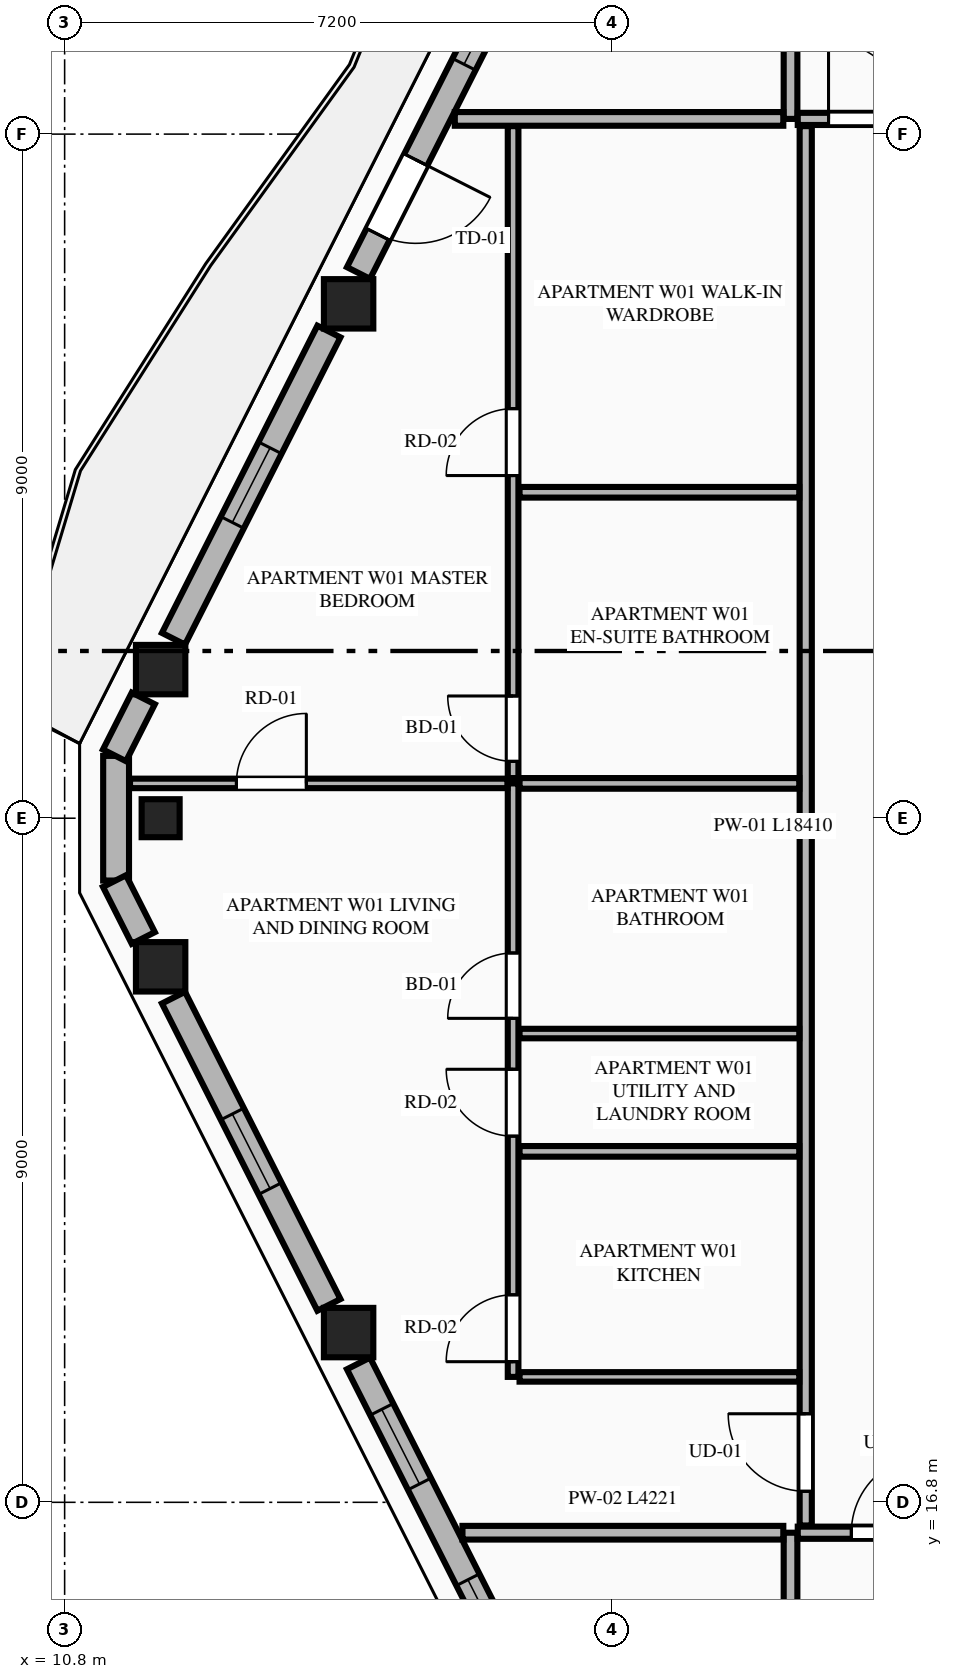
"""IFC4 building model, lengths in metres.
Left out: names, types, materials, properties, quantities, classifications, styles, units other than length and angle.
Written with IfcOpenShell. Run it as: python <this file> out.ifc"""

import sys

from ifc_helpers import new_model, si_unit, direction, frame, frame_2d, origin, origin_2d, place, context, subcontext, project, spatial, rectangle, extrude, element, fill, save


model = new_model("IFC4")
c1 = context("Model", 3, precision=1e-05, world=origin(), true_north=direction((0.0, 1.0)))
c2 = subcontext(c1, "Body", "Model", "MODEL_VIEW")
j1 = project(units=[si_unit("LENGTHUNIT", "METRE"), si_unit("PLANEANGLEUNIT", "RADIAN")], contexts=[c1])
p1 = place(None, origin())
s1 = spatial("IfcSite", under=j1, at=p1, CompositionType="ELEMENT")
p2 = place(p1, origin())
s2 = spatial("IfcBuilding", under=s1, at=p2, CompositionType="ELEMENT")
p3 = place(p2, frame((0.0, 0.0, 274.45)))
s3 = spatial("IfcBuildingStorey", under=s2, at=p3, CompositionType="ELEMENT", Elevation=274.45)
for number, where, z_axis, x_axis in (
    (1, (14.536, 32.567, 0.0), (0.0, 0.0, 1.0), (1.0, 0.0, 0.0)),
    (2, (12.063, 27.755, 0.0), (0.0, 0.0, 1.0), (1.0, 0.0, 0.0)),
    (3, (12.063, 23.845, 0.0), (0.0, 0.0, 1.0), (1.0, 0.0, 0.0)),
    (4, (14.536, 19.033, 0.0), (0.0, 0.0, 1.0), (1.0, 0.0, 0.0)),
):
    element("IfcColumn", number, at=place(p3, frame(where, z_axis=z_axis, x_axis=x_axis)), inside=s3, PredefinedType="COLUMN", context=c2, shape_type="SweptSolid", body=[
        extrude(rectangle(XDim=0.65, YDim=0.65, at=origin_2d()), origin(), (0.0, 0.0, 1.0), 3.65),
    ])
p4 = place(p3, frame((12.063, 25.8, 0.0), z_axis=(0.0, 0.0, 1.0), x_axis=(0.0, -1.0, 0.0)))
e5 = element("IfcColumn", 5, at=p4, inside=s3, PredefinedType="PILASTER", context=c2, shape_type="SweptSolid", body=[
    extrude(rectangle(XDim=0.5, YDim=0.35, at=origin_2d()), origin(), (0.0, 0.0, 1.0), 3.65),
])
p5 = place(p3, frame((11.477, 26.62, 0.0), z_axis=(0.0, 0.0, 1.0), x_axis=(0.0, -1.0, 0.0)))
e6 = element("IfcWall", 6, at=p5, inside=s3, PredefinedType="STANDARD", context=c2, shape_type="SweptSolid", body=[
    extrude(rectangle(XDim=1.64, YDim=0.34, at=frame_2d((0.82, 0.0))), origin(), (0.0, 0.0, 1.0), 3.37),
])
p6 = place(p3, frame((16.798, 37.187, 0.0), z_axis=(0.0, 0.0, 1.0), x_axis=(-0.451447516904, -0.892297674255, 0.0)))
e7 = element("IfcWall", 7, at=p6, inside=s3, PredefinedType="STANDARD", context=c2, shape_type="SweptSolid", body=[
    extrude(rectangle(XDim=4.723, YDim=0.34, at=frame_2d((2.361, 0.0))), origin(), (0.0, 0.0, 1.0), 2.46),
])
p7 = place(p6, frame((3.053, 0.0, 0.0)))
e8 = element("IfcOpeningElement", 8, at=p7, cuts=e7, PredefinedType="OPENING", context=c2, shape_type="SweptSolid", body=[
    extrude(rectangle(XDim=1.1, YDim=2.25, at=frame_2d((0.55, 1.125))), frame((0.0, 0.18, 0.0), z_axis=(0.0, -1.0, 0.0), x_axis=(1.0, 0.0, 0.0)), (0.0, 0.0, 1.0), 0.36),
])
p8 = place(p6, frame((0.546, 0.0, 0.75)))
e9 = element("IfcOpeningElement", 9, at=p8, cuts=e7, PredefinedType="OPENING", context=c2, shape_type="SweptSolid", body=[
    extrude(rectangle(XDim=1.1, YDim=1.56, at=frame_2d((0.55, 0.78))), frame((0.0, 0.18, 0.0), z_axis=(0.0, -1.0, 0.0), x_axis=(1.0, 0.0, 0.0)), (0.0, 0.0, 1.0), 0.36),
])
p9 = place(p3, frame((14.277, 32.203, 0.0), z_axis=(0.0, 0.0, 1.0), x_axis=(-0.45147697324, -0.892282770558, 0.0)))
e10 = element("IfcWall", 10, at=p9, inside=s3, PredefinedType="STANDARD", context=c2, shape_type="SweptSolid", body=[
    extrude(rectangle(XDim=4.53, YDim=0.34, at=frame_2d((2.265, 0.0))), origin(), (0.0, 0.0, 1.0), 2.46),
])
p10 = place(p9, frame((1.715, 0.0, 0.75)))
e11 = element("IfcOpeningElement", 11, at=p10, cuts=e10, PredefinedType="OPENING", context=c2, shape_type="SweptSolid", body=[
    extrude(rectangle(XDim=1.1, YDim=1.56, at=frame_2d((0.55, 0.78))), frame((0.0, 0.18, 0.0), z_axis=(0.0, -1.0, 0.0), x_axis=(1.0, 0.0, 0.0)), (0.0, 0.0, 1.0), 0.36),
])
p11 = place(p3, frame((11.835, 27.376, 0.0), z_axis=(0.0, 0.0, 1.0), x_axis=(-0.45139691133, -0.892323275748, 0.0)))
e12 = element("IfcWall", 12, at=p11, inside=s3, PredefinedType="STANDARD", context=c2, shape_type="SweptSolid", body=[
    extrude(rectangle(XDim=0.839, YDim=0.34, at=frame_2d((0.42, 0.0))), origin(), (0.0, 0.0, 1.0), 3.37),
])
p12 = place(p3, frame((11.456, 24.973, 0.0), z_axis=(0.0, 0.0, 1.0), x_axis=(0.4515140893, -0.892263989615, 0.0)))
e13 = element("IfcWall", 13, at=p12, inside=s3, PredefinedType="STANDARD", context=c2, shape_type="SweptSolid", body=[
    extrude(rectangle(XDim=0.839, YDim=0.34, at=frame_2d((0.419, 0.0))), origin(), (0.0, 0.0, 1.0), 3.37),
])
p13 = place(p3, frame((12.232, 23.439, 0.0), z_axis=(0.0, 0.0, 1.0), x_axis=(0.45147697324, -0.892282770558, 0.0)))
e14 = element("IfcWall", 14, at=p13, inside=s3, PredefinedType="STANDARD", context=c2, shape_type="SweptSolid", body=[
    extrude(rectangle(XDim=4.53, YDim=0.34, at=frame_2d((2.265, 0.0))), origin(), (0.0, 0.0, 1.0), 2.46),
])
p14 = place(p13, frame((1.715, 0.0, 0.75)))
e15 = element("IfcOpeningElement", 15, at=p14, cuts=e14, PredefinedType="OPENING", context=c2, shape_type="SweptSolid", body=[
    extrude(rectangle(XDim=1.1, YDim=1.56, at=frame_2d((0.55, 0.78))), frame((0.0, 0.18, 0.0), z_axis=(0.0, -1.0, 0.0), x_axis=(1.0, 0.0, 0.0)), (0.0, 0.0, 1.0), 0.36),
])
p15 = place(p3, frame((14.666, 18.627, 0.0), z_axis=(0.0, 0.0, 1.0), x_axis=(0.451468341582, -0.892287137949, 0.0)))
e16 = element("IfcWall", 16, at=p15, inside=s3, PredefinedType="STANDARD", context=c2, shape_type="SweptSolid", body=[
    extrude(rectangle(XDim=4.723, YDim=0.34, at=frame_2d((2.361, 0.0))), origin(), (0.0, 0.0, 1.0), 2.46),
])
p16 = place(p15, frame((0.677, 0.0, 0.75)))
e17 = element("IfcOpeningElement", 17, at=p16, cuts=e16, PredefinedType="OPENING", context=c2, shape_type="SweptSolid", body=[
    extrude(rectangle(XDim=1.1, YDim=1.56, at=frame_2d((0.55, 0.78))), frame((0.0, 0.18, 0.0), z_axis=(0.0, -1.0, 0.0), x_axis=(1.0, 0.0, 0.0)), (0.0, 0.0, 1.0), 0.36),
])
p17 = place(p15, frame((3.189, 0.0, 0.75)))
e18 = element("IfcOpeningElement", 18, at=p17, cuts=e16, PredefinedType="OPENING", context=c2, shape_type="SweptSolid", body=[
    extrude(rectangle(XDim=1.1, YDim=1.56, at=frame_2d((0.55, 0.78))), frame((0.0, 0.18, 0.0), z_axis=(0.0, -1.0, 0.0), x_axis=(1.0, 0.0, 0.0)), (0.0, 0.0, 1.0), 0.36),
])
p18 = place(p3, frame((20.35, 8.119, 0.0), z_axis=(0.0, 0.0, 1.0), x_axis=(0.0, 1.0, 0.0)))
e19 = element("IfcWall", 19, at=p18, inside=s3, PredefinedType="PARTITIONING", context=c2, shape_type="SweptSolid", body=[
    extrude(rectangle(XDim=8.281, YDim=0.18, at=frame_2d((4.141, 0.0))), origin(), (0.0, 0.0, 1.0), 3.37),
])
p19 = place(p3, frame((20.445, 16.4, 0.0), z_axis=(0.0, 0.0, 1.0), x_axis=(1.0, 0.0, 0.0)))
e20 = element("IfcWall", 20, at=p19, inside=s3, PredefinedType="PARTITIONING", context=c2, shape_type="SweptSolid", body=[
    extrude(rectangle(XDim=8.606, YDim=0.16, at=frame_2d((4.303, 0.0))), origin(), (0.0, 0.0, 1.0), 3.37),
])
p20 = place(p19, frame((0.705, 0.0, 0.0)))
e21 = element("IfcOpeningElement", 21, at=p20, cuts=e20, PredefinedType="OPENING", context=c2, shape_type="SweptSolid", body=[
    extrude(rectangle(XDim=1.02, YDim=2.25, at=frame_2d((0.51, 1.125))), frame((0.0, 0.09, 0.0), z_axis=(0.0, -1.0, 0.0), x_axis=(1.0, 0.0, 0.0)), (0.0, 0.0, 1.0), 0.18),
])
p21 = place(p3, frame((20.35, 35.0, 0.0), z_axis=(0.0, 0.0, 1.0), x_axis=(0.0, 1.0, 0.0)))
e22 = element("IfcWall", 22, at=p21, inside=s3, PredefinedType="PARTITIONING", context=c2, shape_type="SweptSolid", body=[
    extrude(rectangle(XDim=8.481, YDim=0.18, at=frame_2d((4.24, 0.0))), origin(), (0.0, 0.0, 1.0), 3.37),
])
p22 = place(p3, frame((20.445, 35.0, 0.0), z_axis=(0.0, 0.0, 1.0), x_axis=(1.0, 0.0, 0.0)))
e23 = element("IfcWall", 23, at=p22, inside=s3, PredefinedType="PARTITIONING", context=c2, shape_type="SweptSolid", body=[
    extrude(rectangle(XDim=15.114, YDim=0.16, at=frame_2d((7.557, 0.0))), origin(), (0.0, 0.0, 1.0), 3.37),
])
p23 = place(p22, frame((0.405, 0.0, 0.0)))
e24 = element("IfcOpeningElement", 24, at=p23, cuts=e23, PredefinedType="OPENING", context=c2, shape_type="SweptSolid", body=[
    extrude(rectangle(XDim=1.02, YDim=2.25, at=frame_2d((0.51, 1.125))), frame((0.0, 0.09, 0.0), z_axis=(0.0, -1.0, 0.0), x_axis=(1.0, 0.0, 0.0)), (0.0, 0.0, 1.0), 0.18),
])
p24 = place(p3, frame((16.034, 16.4, 0.0), z_axis=(0.0, 0.0, 1.0), x_axis=(1.0, 0.0, 0.0)))
e25 = element("IfcWall", 25, at=p24, inside=s3, PredefinedType="PARTITIONING", context=c2, shape_type="SweptSolid", body=[
    extrude(rectangle(XDim=4.221, YDim=0.18, at=frame_2d((2.11, 0.0))), origin(), (0.0, 0.0, 1.0), 3.37),
])
p25 = place(p3, frame((15.933, 35.0, 0.0), z_axis=(0.0, 0.0, 1.0), x_axis=(1.0, 0.0, 0.0)))
e26 = element("IfcWall", 26, at=p25, inside=s3, PredefinedType="PARTITIONING", context=c2, shape_type="SweptSolid", body=[
    extrude(rectangle(XDim=4.322, YDim=0.18, at=frame_2d((2.161, 0.0))), origin(), (0.0, 0.0, 1.0), 3.37),
])
p26 = place(p3, frame((20.55, 16.495, 0.0), z_axis=(0.0, 0.0, 1.0), x_axis=(0.0, 1.0, 0.0)))
e27 = element("IfcWall", 27, at=p26, inside=s3, PredefinedType="PARTITIONING", context=c2, shape_type="SweptSolid", body=[
    extrude(rectangle(XDim=18.41, YDim=0.16, at=frame_2d((9.205, 0.0))), origin(), (0.0, 0.0, 1.0), 3.057),
])
p27 = place(p26, frame((0.45, 0.0, 0.0)))
e28 = element("IfcOpeningElement", 28, at=p27, cuts=e27, PredefinedType="OPENING", context=c2, shape_type="SweptSolid", body=[
    extrude(rectangle(XDim=1.02, YDim=2.25, at=frame_2d((0.51, 1.125))), frame((0.0, 0.09, 0.0), z_axis=(0.0, -1.0, 0.0), x_axis=(1.0, 0.0, 0.0)), (0.0, 0.0, 1.0), 0.18),
])
p28 = place(p3, frame((16.785, 18.45, 0.0), z_axis=(0.0, 0.0, 1.0), x_axis=(1.0, 0.0, 0.0)))
e29 = element("IfcWall", 29, at=p28, inside=s3, PredefinedType="PARTITIONING", context=c2, shape_type="SweptSolid", body=[
    extrude(rectangle(XDim=3.68, YDim=0.125, at=frame_2d((1.84, 0.0))), origin(), (0.0, 0.0, 1.0), 3.37),
])
p29 = place(p3, frame((16.7, 18.45, 0.0), z_axis=(0.0, 0.0, 1.0), x_axis=(0.0, 1.0, 0.0)))
e30 = element("IfcWall", 30, at=p29, inside=s3, PredefinedType="PLUMBINGWALL", context=c2, shape_type="SweptSolid", body=[
    extrude(rectangle(XDim=7.808, YDim=0.14, at=frame_2d((3.904, 0.0))), origin(), (0.0, 0.0, 1.0), 3.37),
])
p30 = place(p29, frame((0.2, 0.0, 0.0)))
e31 = element("IfcOpeningElement", 31, at=p30, cuts=e30, PredefinedType="OPENING", context=c2, shape_type="SweptSolid", body=[
    extrude(rectangle(XDim=0.88, YDim=2.15, at=frame_2d((0.44, 1.075))), frame((0.0, 0.08, 0.0), z_axis=(0.0, -1.0, 0.0), x_axis=(1.0, 0.0, 0.0)), (0.0, 0.0, 1.0), 0.16),
])
p31 = place(p29, frame((3.167, 0.0, 0.0)))
e32 = element("IfcOpeningElement", 32, at=p31, cuts=e30, PredefinedType="OPENING", context=c2, shape_type="SweptSolid", body=[
    extrude(rectangle(XDim=0.88, YDim=2.15, at=frame_2d((0.44, 1.075))), frame((0.0, 0.08, 0.0), z_axis=(0.0, -1.0, 0.0), x_axis=(1.0, 0.0, 0.0)), (0.0, 0.0, 1.0), 0.16),
])
p32 = place(p29, frame((4.717, 0.0, 0.0)))
e33 = element("IfcOpeningElement", 33, at=p32, cuts=e30, PredefinedType="OPENING", context=c2, shape_type="SweptSolid", body=[
    extrude(rectangle(XDim=0.86, YDim=2.1, at=frame_2d((0.43, 1.05))), frame((0.0, 0.08, 0.0), z_axis=(0.0, -1.0, 0.0), x_axis=(1.0, 0.0, 0.0)), (0.0, 0.0, 1.0), 0.16),
])
p33 = place(p3, frame((16.7, 26.328, 0.0), z_axis=(0.0, 0.0, 1.0), x_axis=(0.0, 1.0, 0.0)))
e34 = element("IfcWall", 34, at=p33, inside=s3, PredefinedType="PLUMBINGWALL", context=c2, shape_type="SweptSolid", body=[
    extrude(rectangle(XDim=8.577, YDim=0.14, at=frame_2d((4.289, 0.0))), origin(), (0.0, 0.0, 1.0), 3.37),
])
p34 = place(p33, frame((0.22, 0.0, 0.0)))
e35 = element("IfcOpeningElement", 35, at=p34, cuts=e34, PredefinedType="OPENING", context=c2, shape_type="SweptSolid", body=[
    extrude(rectangle(XDim=0.86, YDim=2.1, at=frame_2d((0.43, 1.05))), frame((0.0, 0.08, 0.0), z_axis=(0.0, -1.0, 0.0), x_axis=(1.0, 0.0, 0.0)), (0.0, 0.0, 1.0), 0.16),
])
p35 = place(p33, frame((3.98, 0.0, 0.0)))
e36 = element("IfcOpeningElement", 36, at=p35, cuts=e34, PredefinedType="OPENING", context=c2, shape_type="SweptSolid", body=[
    extrude(rectangle(XDim=0.88, YDim=2.15, at=frame_2d((0.44, 1.075))), frame((0.0, 0.08, 0.0), z_axis=(0.0, -1.0, 0.0), x_axis=(1.0, 0.0, 0.0)), (0.0, 0.0, 1.0), 0.16),
])
p36 = place(p3, frame((16.785, 26.258, 0.0), z_axis=(0.0, 0.0, 1.0), x_axis=(1.0, 0.0, 0.0)))
e37 = element("IfcWall", 37, at=p36, inside=s3, PredefinedType="PLUMBINGWALL", context=c2, shape_type="SweptSolid", body=[
    extrude(rectangle(XDim=3.68, YDim=0.14, at=frame_2d((1.84, 0.0))), origin(), (0.0, 0.0, 1.0), 3.37),
])
p37 = place(p3, frame((11.66, 26.258, 0.0), z_axis=(0.0, 0.0, 1.0), x_axis=(1.0, 0.0, 0.0)))
e38 = element("IfcWall", 38, at=p37, inside=s3, PredefinedType="PARTITIONING", context=c2, shape_type="SweptSolid", body=[
    extrude(rectangle(XDim=4.965, YDim=0.125, at=frame_2d((2.482, 0.0))), origin(), (0.0, 0.0, 1.0), 3.37),
])
p38 = place(p37, frame((1.4, 0.0, 0.0)))
e39 = element("IfcOpeningElement", 39, at=p38, cuts=e38, PredefinedType="OPENING", context=c2, shape_type="SweptSolid", body=[
    extrude(rectangle(XDim=0.92, YDim=2.15, at=frame_2d((0.46, 1.075))), frame((0.0, 0.073, 0.0), z_axis=(0.0, -1.0, 0.0), x_axis=(1.0, 0.0, 0.0)), (0.0, 0.0, 1.0), 0.145),
])
p39 = place(p3, frame((16.785, 21.417, 0.0), z_axis=(0.0, 0.0, 1.0), x_axis=(1.0, 0.0, 0.0)))
e40 = element("IfcWall", 40, at=p39, inside=s3, PredefinedType="PLUMBINGWALL", context=c2, shape_type="SweptSolid", body=[
    extrude(rectangle(XDim=3.68, YDim=0.14, at=frame_2d((1.84, 0.0))), origin(), (0.0, 0.0, 1.0), 3.37),
])
p40 = place(p3, frame((16.785, 22.967, 0.0), z_axis=(0.0, 0.0, 1.0), x_axis=(1.0, 0.0, 0.0)))
e41 = element("IfcWall", 41, at=p40, inside=s3, PredefinedType="PARTITIONING", context=c2, shape_type="SweptSolid", body=[
    extrude(rectangle(XDim=3.68, YDim=0.125, at=frame_2d((1.84, 0.0))), origin(), (0.0, 0.0, 1.0), 3.37),
])
p41 = place(p3, frame((16.785, 30.088, 0.0), z_axis=(0.0, 0.0, 1.0), x_axis=(1.0, 0.0, 0.0)))
e42 = element("IfcWall", 42, at=p41, inside=s3, PredefinedType="PLUMBINGWALL", context=c2, shape_type="SweptSolid", body=[
    extrude(rectangle(XDim=3.68, YDim=0.14, at=frame_2d((1.84, 0.0))), origin(), (0.0, 0.0, 1.0), 3.37),
])
p42 = place(p7, origin())
e43 = element("IfcDoor", 43, at=p42, inside=s3, OperationType="SINGLE_SWING_LEFT", PredefinedType="DOOR", context=c2, shape_type="SweptSolid", body=[
    extrude(rectangle(XDim=1.1, YDim=2.25, at=frame_2d((0.55, 1.125))), frame((0.0, 0.025, 0.0), z_axis=(0.0, -1.0, 0.0), x_axis=(1.0, 0.0, 0.0)), (0.0, 0.0, 1.0), 0.05),
])
fill(e8, e43)
p43 = place(p10, origin())
e44 = element("IfcWindow", 44, at=p43, inside=s3, PartitioningType="SINGLE_PANEL", PredefinedType="WINDOW", context=c2, shape_type="SweptSolid", body=[
    extrude(rectangle(XDim=1.1, YDim=1.56, at=frame_2d((0.55, 0.78))), frame((0.0, 0.03, 0.0), z_axis=(0.0, -1.0, 0.0), x_axis=(1.0, 0.0, 0.0)), (0.0, 0.0, 1.0), 0.06),
])
fill(e11, e44)
p44 = place(p14, origin())
e45 = element("IfcWindow", 45, at=p44, inside=s3, PartitioningType="SINGLE_PANEL", PredefinedType="WINDOW", context=c2, shape_type="SweptSolid", body=[
    extrude(rectangle(XDim=1.1, YDim=1.56, at=frame_2d((0.55, 0.78))), frame((0.0, 0.03, 0.0), z_axis=(0.0, -1.0, 0.0), x_axis=(1.0, 0.0, 0.0)), (0.0, 0.0, 1.0), 0.06),
])
fill(e15, e45)
p45 = place(p16, origin())
e46 = element("IfcWindow", 46, at=p45, inside=s3, PartitioningType="SINGLE_PANEL", PredefinedType="WINDOW", context=c2, shape_type="SweptSolid", body=[
    extrude(rectangle(XDim=1.1, YDim=1.56, at=frame_2d((0.55, 0.78))), frame((0.0, 0.03, 0.0), z_axis=(0.0, -1.0, 0.0), x_axis=(1.0, 0.0, 0.0)), (0.0, 0.0, 1.0), 0.06),
])
fill(e17, e46)
p46 = place(p20, origin())
e47 = element("IfcDoor", 47, at=p46, inside=s3, OperationType="SINGLE_SWING_RIGHT", PredefinedType="DOOR", context=c2, shape_type="SweptSolid", body=[
    extrude(rectangle(XDim=1.02, YDim=2.25, at=frame_2d((0.51, 1.125))), frame((0.0, 0.025, 0.0), z_axis=(0.0, -1.0, 0.0), x_axis=(1.0, 0.0, 0.0)), (0.0, 0.0, 1.0), 0.05),
])
fill(e21, e47)
p47 = place(p23, origin())
e48 = element("IfcDoor", 48, at=p47, inside=s3, OperationType="SINGLE_SWING_LEFT", PredefinedType="DOOR", context=c2, shape_type="SweptSolid", body=[
    extrude(rectangle(XDim=1.02, YDim=2.25, at=frame_2d((0.51, 1.125))), frame((0.0, 0.025, 0.0), z_axis=(0.0, -1.0, 0.0), x_axis=(1.0, 0.0, 0.0)), (0.0, 0.0, 1.0), 0.05),
])
fill(e24, e48)
p48 = place(p30, origin())
e49 = element("IfcDoor", 49, at=p48, inside=s3, OperationType="SINGLE_SWING_LEFT", PredefinedType="DOOR", context=c2, shape_type="SweptSolid", body=[
    extrude(rectangle(XDim=0.88, YDim=2.15, at=frame_2d((0.44, 1.075))), frame((0.0, 0.025, 0.0), z_axis=(0.0, -1.0, 0.0), x_axis=(1.0, 0.0, 0.0)), (0.0, 0.0, 1.0), 0.05),
])
fill(e31, e49)
p49 = place(p31, origin())
e50 = element("IfcDoor", 50, at=p49, inside=s3, OperationType="SINGLE_SWING_RIGHT", PredefinedType="DOOR", context=c2, shape_type="SweptSolid", body=[
    extrude(rectangle(XDim=0.88, YDim=2.15, at=frame_2d((0.44, 1.075))), frame((0.0, 0.025, 0.0), z_axis=(0.0, -1.0, 0.0), x_axis=(1.0, 0.0, 0.0)), (0.0, 0.0, 1.0), 0.05),
])
fill(e32, e50)
p50 = place(p32, origin())
e51 = element("IfcDoor", 51, at=p50, inside=s3, OperationType="SINGLE_SWING_LEFT", PredefinedType="DOOR", context=c2, shape_type="SweptSolid", body=[
    extrude(rectangle(XDim=0.86, YDim=2.1, at=frame_2d((0.43, 1.05))), frame((0.0, 0.025, 0.0), z_axis=(0.0, -1.0, 0.0), x_axis=(1.0, 0.0, 0.0)), (0.0, 0.0, 1.0), 0.05),
])
fill(e33, e51)
p51 = place(p34, origin())
e52 = element("IfcDoor", 52, at=p51, inside=s3, OperationType="SINGLE_SWING_RIGHT", PredefinedType="DOOR", context=c2, shape_type="SweptSolid", body=[
    extrude(rectangle(XDim=0.86, YDim=2.1, at=frame_2d((0.43, 1.05))), frame((0.0, 0.025, 0.0), z_axis=(0.0, -1.0, 0.0), x_axis=(1.0, 0.0, 0.0)), (0.0, 0.0, 1.0), 0.05),
])
fill(e35, e52)
p52 = place(p35, origin())
e53 = element("IfcDoor", 53, at=p52, inside=s3, OperationType="SINGLE_SWING_LEFT", PredefinedType="DOOR", context=c2, shape_type="SweptSolid", body=[
    extrude(rectangle(XDim=0.88, YDim=2.15, at=frame_2d((0.44, 1.075))), frame((0.0, 0.025, 0.0), z_axis=(0.0, -1.0, 0.0), x_axis=(1.0, 0.0, 0.0)), (0.0, 0.0, 1.0), 0.05),
])
fill(e36, e53)
p53 = place(p27, origin())
e54 = element("IfcDoor", 54, at=p53, inside=s3, OperationType="SINGLE_SWING_RIGHT", PredefinedType="DOOR", context=c2, shape_type="SweptSolid", body=[
    extrude(rectangle(XDim=1.02, YDim=2.25, at=frame_2d((0.51, 1.125))), frame((0.0, 0.025, 0.0), z_axis=(0.0, -1.0, 0.0), x_axis=(1.0, 0.0, 0.0)), (0.0, 0.0, 1.0), 0.05),
])
fill(e28, e54)
p54 = place(p38, origin())
e55 = element("IfcDoor", 55, at=p54, inside=s3, OperationType="SINGLE_SWING_RIGHT", PredefinedType="DOOR", context=c2, shape_type="SweptSolid", body=[
    extrude(rectangle(XDim=0.92, YDim=2.15, at=frame_2d((0.46, 1.075))), frame((0.0, 0.025, 0.0), z_axis=(0.0, -1.0, 0.0), x_axis=(1.0, 0.0, 0.0)), (0.0, 0.0, 1.0), 0.05),
])
fill(e39, e55)
p55 = place(p8, origin())
e56 = element("IfcWindow", 56, at=p55, inside=s3, PartitioningType="SINGLE_PANEL", PredefinedType="WINDOW", context=c2, shape_type="SweptSolid", body=[
    extrude(rectangle(XDim=1.1, YDim=1.56, at=frame_2d((0.55, 0.78))), frame((0.0, 0.03, 0.0), z_axis=(0.0, -1.0, 0.0), x_axis=(1.0, 0.0, 0.0)), (0.0, 0.0, 1.0), 0.06),
])
fill(e9, e56)
p56 = place(p17, origin())
e57 = element("IfcWindow", 57, at=p56, inside=s3, PartitioningType="SINGLE_PANEL", PredefinedType="WINDOW", context=c2, shape_type="SweptSolid", body=[
    extrude(rectangle(XDim=1.1, YDim=1.56, at=frame_2d((0.55, 0.78))), frame((0.0, 0.03, 0.0), z_axis=(0.0, -1.0, 0.0), x_axis=(1.0, 0.0, 0.0)), (0.0, 0.0, 1.0), 0.06),
])
fill(e18, e57)
save(model, sys.argv[1])
